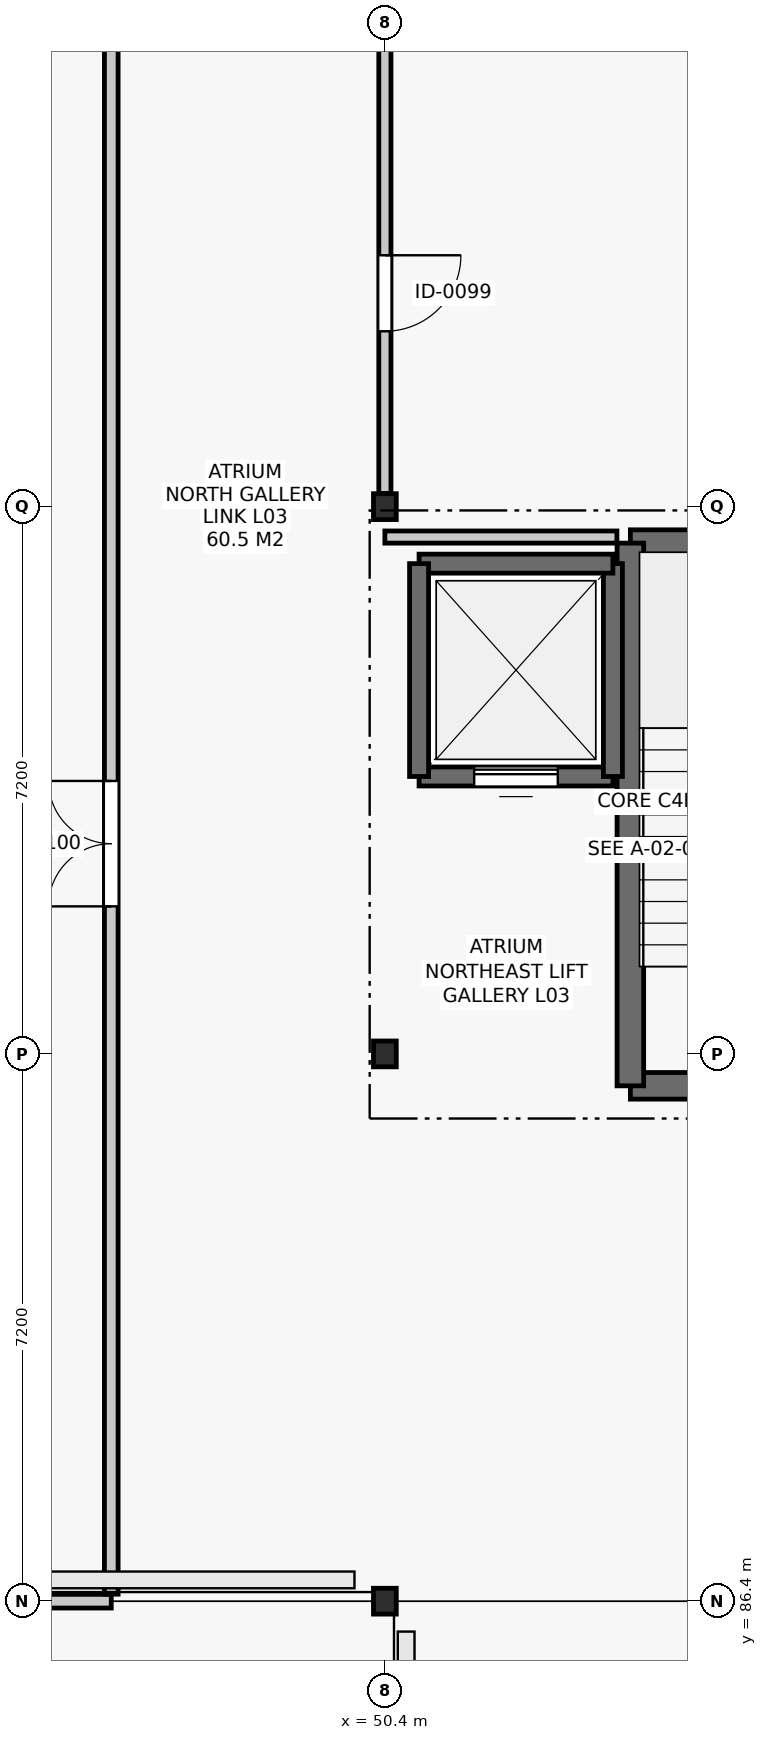
"""IFC4 building model, lengths in metres.
Left out: names, types, materials, properties, quantities, classifications, styles, units other than length and angle.
Written with IfcOpenShell. Run it as: python <this file> out.ifc"""

import sys

from ifc_helpers import new_model, si_unit, direction, frame, frame_2d, origin, origin_2d, place, context, subcontext, project, spatial, rectangle, i_section, extrude, element, fill, save


model = new_model("IFC4")
c1 = context("Model", 3, precision=1e-05, world=origin(), true_north=direction((0.0, 1.0)))
c2 = subcontext(c1, "Body", "Model", "MODEL_VIEW")
j1 = project(units=[si_unit("LENGTHUNIT", "METRE"), si_unit("PLANEANGLEUNIT", "RADIAN")], contexts=[c1])
p1 = place(None, origin())
s1 = spatial("IfcSite", under=j1, at=p1, CompositionType="ELEMENT")
p2 = place(p1, origin())
s2 = spatial("IfcBuilding", under=s1, at=p2, CompositionType="ELEMENT")
p3 = place(p2, frame((0.0, 0.0, 14.4)))
s3 = spatial("IfcBuildingStorey", under=s2, at=p3, CompositionType="ELEMENT", Elevation=14.4)
for number, where, z_axis, x_axis in (
    (1, (50.4, 86.4, 0.0), (0.0, 0.0, 1.0), (1.0, 0.0, 0.0)),
    (2, (50.4, 93.6, 0.0), (0.0, 0.0, 1.0), (1.0, 0.0, 0.0)),
    (3, (50.4, 100.8, 0.0), (0.0, 0.0, 1.0), (1.0, 0.0, 0.0)),
):
    element("IfcColumn", number, at=place(p3, frame(where, z_axis=z_axis, x_axis=x_axis)), inside=s3, PredefinedType="COLUMN", context=c2, shape_type="SweptSolid", body=[
        extrude(i_section(OverallWidth=0.3, OverallDepth=0.34, WebThickness=0.012, FlangeThickness=0.021, FilletRadius=0.027, at=origin_2d()), origin(), (0.0, 0.0, 1.0), 4.2),
    ])
p4 = place(p3, frame((53.63, 93.18, 0.0), z_axis=(0.0, 0.0, 1.0), x_axis=(1.0, 0.0, 0.0)))
e4 = element("IfcWall", 4, at=p4, inside=s3, PredefinedType="SHEAR", context=c2, shape_type="SweptSolid", body=[
    extrude(rectangle(XDim=3.44, YDim=0.35, at=frame_2d((1.72, 0.0))), origin(), (0.0, 0.0, 1.0), 3.94),
])
p5 = place(p4, frame((1.17, 0.0, 0.0)))
e5 = element("IfcOpeningElement", 5, at=p5, cuts=e4, PredefinedType="OPENING", context=c2, shape_type="SweptSolid", body=[
    extrude(rectangle(XDim=1.1, YDim=2.15, at=frame_2d((0.55, 1.075))), frame((0.0, 0.187, 0.0), z_axis=(0.0, -1.0, 0.0), x_axis=(1.0, 0.0, 0.0)), (0.0, 0.0, 1.0), 0.374),
])
p6 = place(p3, frame((57.07, 100.32, 0.0), z_axis=(0.0, 0.0, 1.0), x_axis=(-1.0, 0.0, 0.0)))
e6 = element("IfcWall", 6, at=p6, inside=s3, PredefinedType="SHEAR", context=c2, shape_type="SweptSolid", body=[
    extrude(rectangle(XDim=3.44, YDim=0.35, at=frame_2d((1.72, 0.0))), origin(), (0.0, 0.0, 1.0), 3.94),
])
p7 = place(p3, frame((53.63, 100.32, 0.0), z_axis=(0.0, 0.0, 1.0), x_axis=(0.0, -1.0, 0.0)))
e7 = element("IfcWall", 7, at=p7, inside=s3, PredefinedType="SHEAR", context=c2, shape_type="SweptSolid", body=[
    extrude(rectangle(XDim=7.14, YDim=0.35, at=frame_2d((3.57, 0.0))), origin(), (0.0, 0.0, 1.0), 3.94),
])
p8 = place(p3, frame((50.85, 97.25, 0.0), z_axis=(0.0, 0.0, 1.0), x_axis=(1.0, 0.0, 0.0)))
e8 = element("IfcWall", 8, at=p8, inside=s3, PredefinedType="SHEAR", context=c2, shape_type="SweptSolid", body=[
    extrude(rectangle(XDim=2.55, YDim=0.25, at=frame_2d((1.275, 0.0))), origin(), (0.0, 0.0, 1.0), 3.94),
])
p9 = place(p8, frame((0.725, 0.0, 0.0)))
e9 = element("IfcOpeningElement", 9, at=p9, cuts=e8, PredefinedType="OPENING", context=c2, shape_type="SweptSolid", body=[
    extrude(rectangle(XDim=1.1, YDim=2.1, at=frame_2d((0.55, 1.05))), frame((0.0, 0.137, 0.0), z_axis=(0.0, -1.0, 0.0), x_axis=(1.0, 0.0, 0.0)), (0.0, 0.0, 1.0), 0.274),
])
p10 = place(p3, frame((53.4, 97.25, 0.0), z_axis=(0.0, 0.0, 1.0), x_axis=(0.0, 1.0, 0.0)))
e10 = element("IfcWall", 10, at=p10, inside=s3, PredefinedType="SHEAR", context=c2, shape_type="SweptSolid", body=[
    extrude(rectangle(XDim=2.8, YDim=0.25, at=frame_2d((1.4, 0.0))), origin(), (0.0, 0.0, 1.0), 3.94),
])
p11 = place(p3, frame((53.4, 100.05, 0.0), z_axis=(0.0, 0.0, 1.0), x_axis=(-1.0, 0.0, 0.0)))
e11 = element("IfcWall", 11, at=p11, inside=s3, PredefinedType="SHEAR", context=c2, shape_type="SweptSolid", body=[
    extrude(rectangle(XDim=2.55, YDim=0.25, at=frame_2d((1.275, 0.0))), origin(), (0.0, 0.0, 1.0), 3.94),
])
p12 = place(p3, frame((50.85, 100.05, 0.0), z_axis=(0.0, 0.0, 1.0), x_axis=(0.0, -1.0, 0.0)))
e12 = element("IfcWall", 12, at=p12, inside=s3, PredefinedType="SHEAR", context=c2, shape_type="SweptSolid", body=[
    extrude(rectangle(XDim=2.8, YDim=0.25, at=frame_2d((1.4, 0.0))), origin(), (0.0, 0.0, 1.0), 3.94),
])
p13 = place(p3, frame((50.4, 100.4, 0.0), z_axis=(0.0, 0.0, 1.0), x_axis=(1.0, 0.0, 0.0)))
e13 = element("IfcWall", 13, at=p13, inside=s3, PredefinedType="PARTITIONING", context=c2, shape_type="SweptSolid", body=[
    extrude(rectangle(XDim=3.053, YDim=0.16, at=frame_2d((1.526, 0.0))), origin(), (0.0, 0.0, 1.0), 3.575),
])
p14 = place(p3, frame((43.354, 86.4, 0.0), z_axis=(0.0, 0.0, 1.0), x_axis=(1.0, 0.0, 0.0)))
e14 = element("IfcWall", 14, at=p14, inside=s3, PredefinedType="PARTITIONING", context=c2, shape_type="SweptSolid", body=[
    extrude(rectangle(XDim=3.446, YDim=0.18, at=frame_2d((1.723, 0.0))), origin(), (0.0, 0.0, 1.0), 3.925),
])
p15 = place(p3, frame((50.4, 100.974, 0.0), z_axis=(0.0, 0.0, 1.0), x_axis=(0.0, 1.0, 0.0)))
e15 = element("IfcWall", 15, at=p15, inside=s3, PredefinedType="PARTITIONING", context=c2, shape_type="SweptSolid", body=[
    extrude(rectangle(XDim=6.852, YDim=0.16, at=frame_2d((3.426, 0.0))), origin(), (0.0, 0.0, 1.0), 3.495),
])
p16 = place(p15, frame((2.133, 0.0, 0.0)))
e16 = element("IfcOpeningElement", 16, at=p16, cuts=e15, PredefinedType="OPENING", context=c2, shape_type="SweptSolid", body=[
    extrude(rectangle(XDim=1.0, YDim=2.15, at=frame_2d((0.5, 1.075))), frame((0.0, 0.092, 0.0), z_axis=(0.0, -1.0, 0.0), x_axis=(1.0, 0.0, 0.0)), (0.0, 0.0, 1.0), 0.184),
])
p17 = place(p3, frame((46.8, 86.492, 0.0), z_axis=(0.0, 0.0, 1.0), x_axis=(0.0, 1.0, 0.0)))
e17 = element("IfcWall", 17, at=p17, inside=s3, PredefinedType="PARTITIONING", context=c2, shape_type="SweptSolid", body=[
    extrude(rectangle(XDim=28.653, YDim=0.18, at=frame_2d((14.327, 0.0))), origin(), (0.0, 0.0, 1.0), 3.295),
])
p18 = place(p17, frame((9.049, 0.0, 0.0)))
e18 = element("IfcOpeningElement", 18, at=p18, cuts=e17, PredefinedType="OPENING", context=c2, shape_type="SweptSolid", body=[
    extrude(rectangle(XDim=1.65, YDim=2.25, at=frame_2d((0.825, 1.125))), frame((0.0, 0.102, 0.0), z_axis=(0.0, -1.0, 0.0), x_axis=(1.0, 0.0, 0.0)), (0.0, 0.0, 1.0), 0.204),
])
p19 = place(p9, origin())
e19 = element("IfcDoor", 19, at=p19, inside=s3, OperationType="SLIDING_TO_LEFT", PredefinedType="DOOR", context=c2, shape_type="SweptSolid", body=[
    extrude(rectangle(XDim=1.1, YDim=2.1, at=frame_2d((0.55, 1.05))), frame((0.0, 0.025, 0.0), z_axis=(0.0, -1.0, 0.0), x_axis=(1.0, 0.0, 0.0)), (0.0, 0.0, 1.0), 0.05),
])
fill(e9, e19)
p20 = place(p16, frame((1.0, 0.0, 0.0), z_axis=(0.0, 0.0, 1.0), x_axis=(-1.0, 0.0, 0.0)))
e20 = element("IfcDoor", 20, at=p20, inside=s3, OperationType="SINGLE_SWING_LEFT", PredefinedType="DOOR", context=c2, shape_type="SweptSolid", body=[
    extrude(rectangle(XDim=1.0, YDim=2.15, at=frame_2d((0.5, 1.075))), frame((0.0, 0.025, 0.0), z_axis=(0.0, -1.0, 0.0), x_axis=(1.0, 0.0, 0.0)), (0.0, 0.0, 1.0), 0.05),
])
fill(e16, e20)
p21 = place(p18, origin())
e21 = element("IfcDoor", 21, at=p21, inside=s3, OperationType="DOUBLE_DOOR_SINGLE_SWING", PredefinedType="DOOR", context=c2, shape_type="SweptSolid", body=[
    extrude(rectangle(XDim=1.65, YDim=2.25, at=frame_2d((0.825, 1.125))), frame((0.0, 0.025, 0.0), z_axis=(0.0, -1.0, 0.0), x_axis=(1.0, 0.0, 0.0)), (0.0, 0.0, 1.0), 0.05),
])
fill(e18, e21)
save(model, sys.argv[1])
